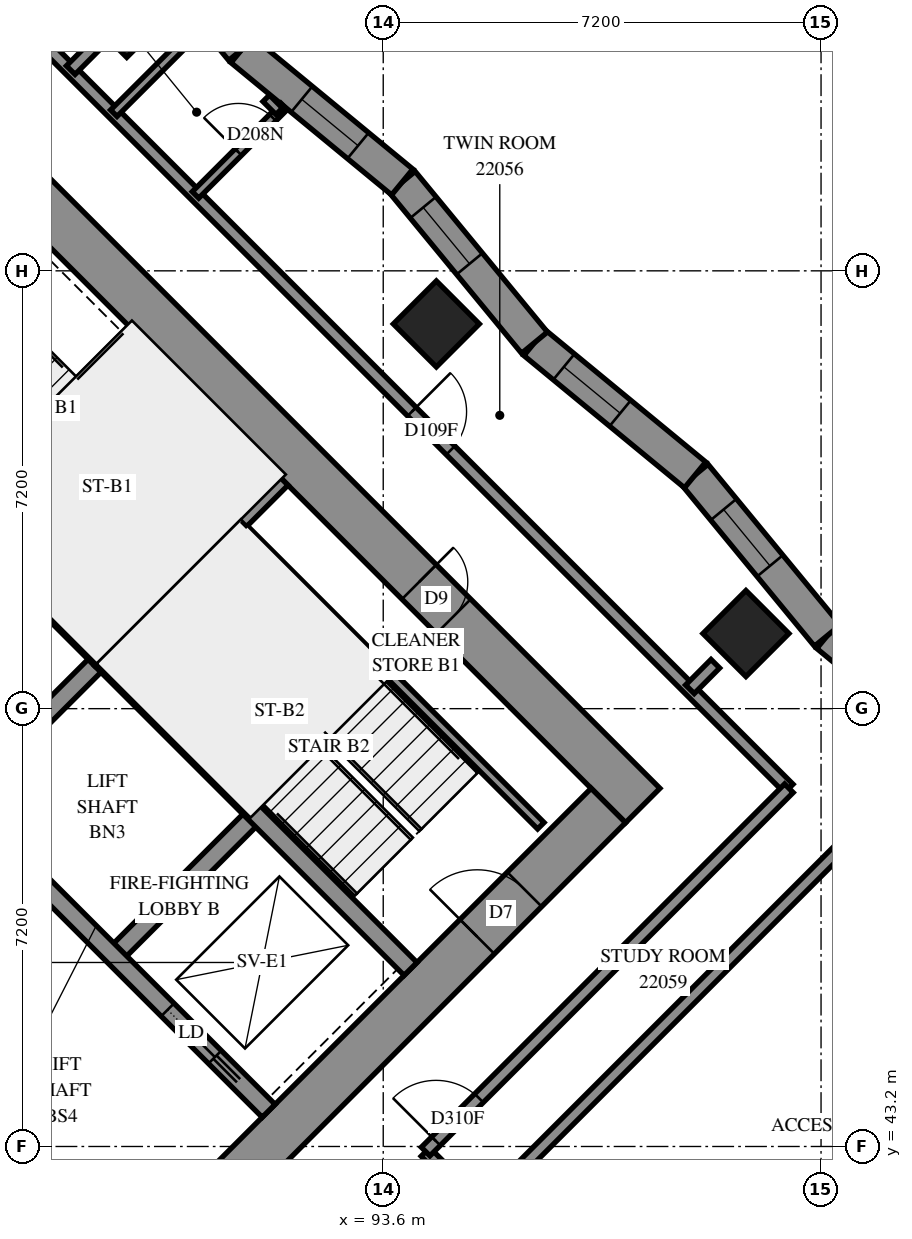
"""IFC4 building model, lengths in metres.
Left out: names, types, materials, properties, quantities, classifications, styles, units other than length and angle.
Written with IfcOpenShell. Run it as: python <this file> out.ifc"""

import sys

from ifc_helpers import new_model, si_unit, direction, frame, frame_2d, origin, origin_2d, place, context, subcontext, project, spatial, polyline, rectangle, outline, extrude, element, fill, save


model = new_model("IFC4")
c1 = context("Model", 3, precision=1e-05, world=origin(), true_north=direction((0.0, 1.0)))
c2 = subcontext(c1, "Body", "Model", "MODEL_VIEW")
j1 = project(units=[si_unit("LENGTHUNIT", "METRE"), si_unit("PLANEANGLEUNIT", "RADIAN")], contexts=[c1])
p1 = place(None, origin())
s1 = spatial("IfcSite", under=j1, at=p1, CompositionType="ELEMENT")
p2 = place(p1, origin())
s2 = spatial("IfcBuilding", under=s1, at=p2, CompositionType="ELEMENT")
p3 = place(p2, frame((0.0, 0.0, 84.6)))
s3 = spatial("IfcBuildingStorey", under=s2, at=p3, CompositionType="ELEMENT", Elevation=84.6)
for number, where, z_axis, x_axis in (
    (1, (89.382, 61.818, 0.0), (0.0, 0.0, 1.0), (0.707, -0.707, 0.0)),
    (2, (94.474, 56.727, 0.0), (0.0, 0.0, 1.0), (0.707, -0.707, 0.0)),
    (3, (99.565, 51.635, 0.0), (0.0, 0.0, 1.0), (0.707, -0.707, 0.0)),
):
    element("IfcColumn", number, at=place(p3, frame(where, z_axis=z_axis, x_axis=x_axis)), inside=s3, PredefinedType="COLUMN", context=c2, shape_type="SweptSolid", body=[
        extrude(rectangle(XDim=1.0, YDim=1.0, at=origin_2d()), origin(), (0.0, 0.0, 1.0), 3.1),
    ])
p4 = place(p3, frame((86.554, 60.121, -0.3), z_axis=(0.0, 0.0, 1.0), x_axis=(0.7071067812, -0.7071067812, 0.0)))
e4 = element("IfcWall", 4, at=p4, inside=s3, PredefinedType="SHEAR", context=c2, shape_type="SweptSolid", body=[
    extrude(rectangle(XDim=16.0, YDim=0.8, at=frame_2d((8.0, 0.0))), origin(), (0.0, 0.0, 1.0), 2.7),
])
p5 = place(p4, frame((10.8, 0.0, 0.3)))
e5 = element("IfcOpeningElement", 5, at=p5, cuts=e4, PredefinedType="OPENING", context=c2, shape_type="SweptSolid", body=[
    extrude(rectangle(XDim=0.8, YDim=2.1, at=frame_2d((0.4, 1.05))), frame((0.0, 0.41, 0.0), z_axis=(0.0, -1.0, 0.0), x_axis=(1.0, 0.0, 0.0)), (0.0, 0.0, 1.0), 0.82),
])
p6 = place(p3, frame((87.12, 38.625, -0.3), z_axis=(0.0, 0.0, 1.0), x_axis=(0.7071067812, 0.7071067812, 0.0)))
e6 = element("IfcWall", 6, at=p6, inside=s3, PredefinedType="SHEAR", context=c2, shape_type="SweptSolid", body=[
    extrude(rectangle(XDim=14.4, YDim=0.8, at=frame_2d((7.2, 0.0))), origin(), (0.0, 0.0, 1.0), 2.7),
])
p7 = place(p6, frame((4.55, 0.0, 0.3)))
e7 = element("IfcOpeningElement", 7, at=p7, cuts=e6, PredefinedType="OPENING", context=c2, shape_type="SweptSolid", body=[
    extrude(rectangle(XDim=1.1, YDim=2.1, at=frame_2d((0.55, 1.05))), frame((0.0, 0.41, 0.0), z_axis=(0.0, -1.0, 0.0), x_axis=(1.0, 0.0, 0.0)), (0.0, 0.0, 1.0), 0.82),
])
p8 = place(p6, frame((11.35, 0.0, 0.3)))
e8 = element("IfcOpeningElement", 8, at=p8, cuts=e6, PredefinedType="OPENING", context=c2, shape_type="SweptSolid", body=[
    extrude(rectangle(XDim=1.1, YDim=2.1, at=frame_2d((0.55, 1.05))), frame((0.0, 0.41, 0.0), z_axis=(0.0, -1.0, 0.0), x_axis=(1.0, 0.0, 0.0)), (0.0, 0.0, 1.0), 0.82),
])
for number, where, z_axis, x_axis in (
    (9, (86.625, 48.878, 0.0), (0.0, 0.0, 1.0), (0.707, 0.707, 0.0)),
    (10, (89.17, 46.332, 0.0), (0.0, 0.0, 1.0), (0.707, 0.707, 0.0)),
):
    element("IfcWall", number, at=place(p3, frame(where, z_axis=z_axis, x_axis=x_axis)), inside=s3, PredefinedType="SOLIDWALL", context=c2, shape_type="SweptSolid", body=[
        extrude(rectangle(XDim=3.3, YDim=0.3, at=frame_2d((1.65, 0.0))), origin(), (0.0, 0.0, 1.0), 3.1),
    ])
p9 = place(p3, frame((78.988, 51.423, 0.0), z_axis=(0.0, 0.0, 1.0), x_axis=(0.7071067812, -0.7071067812, 0.0)))
e11 = element("IfcWall", 11, at=p9, inside=s3, PredefinedType="SOLIDWALL", context=c2, shape_type="SweptSolid", body=[
    extrude(rectangle(XDim=14.4, YDim=0.3, at=frame_2d((7.2, 0.0))), origin(), (0.0, 0.0, 1.0), 3.1),
])
p10 = place(p9, frame((1.25, 0.0, 0.0)))
e12 = element("IfcOpeningElement", 12, at=p10, cuts=e11, PredefinedType="OPENING", context=c2, shape_type="SweptSolid", body=[
    extrude(rectangle(XDim=1.1, YDim=2.1, at=frame_2d((0.55, 1.05))), frame((0.0, 0.16, 0.0), z_axis=(0.0, -1.0, 0.0), x_axis=(1.0, 0.0, 0.0)), (0.0, 0.0, 1.0), 0.32),
])
p11 = place(p9, frame((4.85, 0.0, 0.0)))
e13 = element("IfcOpeningElement", 13, at=p11, cuts=e11, PredefinedType="OPENING", context=c2, shape_type="SweptSolid", body=[
    extrude(rectangle(XDim=1.1, YDim=2.1, at=frame_2d((0.55, 1.05))), frame((0.0, 0.16, 0.0), z_axis=(0.0, -1.0, 0.0), x_axis=(1.0, 0.0, 0.0)), (0.0, 0.0, 1.0), 0.32),
])
p12 = place(p9, frame((8.45, 0.0, 0.0)))
e14 = element("IfcOpeningElement", 14, at=p12, cuts=e11, PredefinedType="OPENING", context=c2, shape_type="SweptSolid", body=[
    extrude(rectangle(XDim=1.1, YDim=2.1, at=frame_2d((0.55, 1.05))), frame((0.0, 0.16, 0.0), z_axis=(0.0, -1.0, 0.0), x_axis=(1.0, 0.0, 0.0)), (0.0, 0.0, 1.0), 0.32),
])
p13 = place(p9, frame((12.05, 0.0, 0.0)))
e15 = element("IfcOpeningElement", 15, at=p13, cuts=e11, PredefinedType="OPENING", context=c2, shape_type="SweptSolid", body=[
    extrude(rectangle(XDim=1.1, YDim=2.1, at=frame_2d((0.55, 1.05))), frame((0.0, 0.16, 0.0), z_axis=(0.0, -1.0, 0.0), x_axis=(1.0, 0.0, 0.0)), (0.0, 0.0, 1.0), 0.32),
])
p14 = place(p3, frame((81.534, 53.969, 0.0), z_axis=(0.0, 0.0, 1.0), x_axis=(0.707103309, -0.7071102534, 0.0)))
e16 = element("IfcWall", 16, at=p14, inside=s3, PredefinedType="SOLIDWALL", context=c2, shape_type="SweptSolid", body=[
    extrude(rectangle(XDim=14.4, YDim=0.3, at=frame_2d((7.2, 0.0))), origin(), (0.0, 0.0, 1.0), 3.1),
])
p15 = place(p14, frame((12.05, 0.0, 0.0)))
e17 = element("IfcOpeningElement", 17, at=p15, cuts=e16, PredefinedType="OPENING", context=c2, shape_type="SweptSolid", body=[
    extrude(rectangle(XDim=1.1, YDim=2.1, at=frame_2d((0.55, 1.05))), frame((0.0, 0.16, 0.0), z_axis=(0.0, -1.0, 0.0), x_axis=(1.0, 0.0, 0.0)), (0.0, 0.0, 1.0), 0.32),
])
for number, where, z_axis, x_axis in (
    (18, (83.867, 56.302, 0.0), (0.0, 0.0, 1.0), (0.707, -0.707, 0.0)),
    (19, (88.958, 51.211, 0.0), (0.0, 0.0, 1.0), (0.707, -0.707, 0.0)),
):
    element("IfcWall", number, at=place(p3, frame(where, z_axis=z_axis, x_axis=x_axis)), inside=s3, PredefinedType="SOLIDWALL", context=c2, shape_type="SweptSolid", body=[
        extrude(rectangle(XDim=7.2, YDim=0.3, at=frame_2d((3.6, 0.0))), origin(), (0.0, 0.0, 1.0), 3.1),
    ])
p16 = place(p3, frame((88.958, 51.211, 0.0), z_axis=(0.0, 0.0, 1.0), x_axis=(0.7071067812, 0.7071067812, 0.0)))
e20 = element("IfcWall", 20, at=p16, inside=s3, PredefinedType="SOLIDWALL", context=c2, shape_type="SweptSolid", body=[
    extrude(rectangle(XDim=4.2, YDim=0.3, at=frame_2d((2.1, 0.0))), origin(), (0.0, 0.0, 1.0), 3.1),
])
p17 = place(p3, frame((103.546, 49.427, 0.0), z_axis=(0.0, 0.0, 1.0), x_axis=(-0.7720069983, 0.6356140296, 0.0)))
e21 = element("IfcWall", 21, at=p17, inside=s3, PredefinedType="SOLIDWALL", context=c2, shape_type="SweptSolid", body=[
    extrude(outline(polyline([(-0.027, -0.275), (3.395, -0.275), (3.449, 0.275), (0.027, 0.275), (-0.027, -0.275)])), origin(), (0.0, 0.0, 1.0), 3.1),
])
p18 = place(p17, frame((1.401, 0.0, 0.5)))
e22 = element("IfcOpeningElement", 22, at=p18, cuts=e21, PredefinedType="OPENING", context=c2, shape_type="SweptSolid", body=[
    extrude(rectangle(XDim=1.2, YDim=2.45, at=frame_2d((0.6, 1.225))), frame((0.0, 0.285, 0.0), z_axis=(0.0, -1.0, 0.0), x_axis=(1.0, 0.0, 0.0)), (0.0, 0.0, 1.0), 0.57),
])
p19 = place(p3, frame((100.904, 51.602, 0.0), z_axis=(0.0, 0.0, 1.0), x_axis=(-0.6356171067, 0.7720044648, 0.0)))
e23 = element("IfcWall", 23, at=p19, inside=s3, PredefinedType="SOLIDWALL", context=c2, shape_type="SweptSolid", body=[
    extrude(outline(polyline([(0.027, -0.275), (3.449, -0.275), (3.395, 0.275), (-0.027, 0.275), (0.027, -0.275)])), origin(), (0.0, 0.0, 1.0), 3.1),
])
p20 = place(p19, frame((1.485, 0.0, 0.5)))
e24 = element("IfcOpeningElement", 24, at=p20, cuts=e23, PredefinedType="OPENING", context=c2, shape_type="SweptSolid", body=[
    extrude(rectangle(XDim=1.2, YDim=2.45, at=frame_2d((0.6, 1.225))), frame((0.0, 0.285, 0.0), z_axis=(0.0, -1.0, 0.0), x_axis=(1.0, 0.0, 0.0)), (0.0, 0.0, 1.0), 0.57),
])
p21 = place(p3, frame((98.729, 54.244, 0.0), z_axis=(0.0, 0.0, 1.0), x_axis=(-0.7720044648, 0.6356171067, 0.0)))
e25 = element("IfcWall", 25, at=p21, inside=s3, PredefinedType="SOLIDWALL", context=c2, shape_type="SweptSolid", body=[
    extrude(outline(polyline([(-0.027, -0.275), (3.395, -0.275), (3.449, 0.275), (0.027, 0.275), (-0.027, -0.275)])), origin(), (0.0, 0.0, 1.0), 3.1),
])
p22 = place(p21, frame((1.596, 0.0, 0.5)))
e26 = element("IfcOpeningElement", 26, at=p22, cuts=e25, PredefinedType="OPENING", context=c2, shape_type="SweptSolid", body=[
    extrude(rectangle(XDim=1.2, YDim=2.45, at=frame_2d((0.6, 1.225))), frame((0.0, 0.285, 0.0), z_axis=(0.0, -1.0, 0.0), x_axis=(1.0, 0.0, 0.0)), (0.0, 0.0, 1.0), 0.57),
])
p23 = place(p3, frame((96.088, 56.419, 0.0), z_axis=(0.0, 0.0, 1.0), x_axis=(-0.6356140296, 0.7720069983, 0.0)))
e27 = element("IfcWall", 27, at=p23, inside=s3, PredefinedType="SOLIDWALL", context=c2, shape_type="SweptSolid", body=[
    extrude(outline(polyline([(0.027, -0.275), (3.449, -0.275), (3.395, 0.275), (-0.027, 0.275), (0.027, -0.275)])), origin(), (0.0, 0.0, 1.0), 3.1),
])
p24 = place(p23, frame((1.68, 0.0, 0.5)))
e28 = element("IfcOpeningElement", 28, at=p24, cuts=e27, PredefinedType="OPENING", context=c2, shape_type="SweptSolid", body=[
    extrude(rectangle(XDim=1.2, YDim=2.45, at=frame_2d((0.6, 1.225))), frame((0.0, 0.285, 0.0), z_axis=(0.0, -1.0, 0.0), x_axis=(1.0, 0.0, 0.0)), (0.0, 0.0, 1.0), 0.57),
])
p25 = place(p3, frame((93.913, 59.06, 0.0), z_axis=(0.0, 0.0, 1.0), x_axis=(-0.7720044648, 0.6356171067, 0.0)))
e29 = element("IfcWall", 29, at=p25, inside=s3, PredefinedType="SOLIDWALL", context=c2, shape_type="SweptSolid", body=[
    extrude(outline(polyline([(-0.027, -0.275), (3.395, -0.275), (3.449, 0.275), (0.027, 0.275), (-0.027, -0.275)])), origin(), (0.0, 0.0, 1.0), 3.1),
])
p26 = place(p25, frame((0.941, 0.0, 0.5)))
e30 = element("IfcOpeningElement", 30, at=p26, cuts=e29, PredefinedType="OPENING", context=c2, shape_type="SweptSolid", body=[
    extrude(rectangle(XDim=1.2, YDim=2.45, at=frame_2d((0.6, 1.225))), frame((0.0, 0.285, 0.0), z_axis=(0.0, -1.0, 0.0), x_axis=(1.0, 0.0, 0.0)), (0.0, 0.0, 1.0), 0.57),
])
p27 = place(p3, frame((91.271, 61.235, 0.0), z_axis=(0.0, 0.0, 1.0), x_axis=(-0.6356171067, 0.7720044648, 0.0)))
e31 = element("IfcWall", 31, at=p27, inside=s3, PredefinedType="SOLIDWALL", context=c2, shape_type="SweptSolid", body=[
    extrude(outline(polyline([(0.027, -0.275), (3.449, -0.275), (3.395, 0.275), (-0.027, 0.275), (0.027, -0.275)])), origin(), (0.0, 0.0, 1.0), 3.1),
])
p28 = place(p27, frame((1.875, 0.0, 0.5)))
e32 = element("IfcOpeningElement", 32, at=p28, cuts=e31, PredefinedType="OPENING", context=c2, shape_type="SweptSolid", body=[
    extrude(rectangle(XDim=1.2, YDim=2.45, at=frame_2d((0.6, 1.225))), frame((0.0, 0.285, 0.0), z_axis=(0.0, -1.0, 0.0), x_axis=(1.0, 0.0, 0.0)), (0.0, 0.0, 1.0), 0.57),
])
p29 = place(p27, frame((0.925, 0.0, 0.45)))
e33 = element("IfcOpeningElement", 33, at=p29, cuts=e31, PredefinedType="OPENING", context=c2, shape_type="SweptSolid", body=[
    extrude(rectangle(XDim=0.8, YDim=2.5, at=frame_2d((0.4, 1.25))), frame((0.0, 0.285, 0.0), z_axis=(0.0, -1.0, 0.0), x_axis=(1.0, 0.0, 0.0)), (0.0, 0.0, 1.0), 0.57),
])
p30 = place(p3, frame((91.313, 53.354, 0.0), z_axis=(0.0, 0.0, 1.0), x_axis=(0.7071140275, -0.7070995348, 0.0)))
e34 = element("IfcWall", 34, at=p30, inside=s3, PredefinedType="PARTITIONING", context=c2, shape_type="SweptSolid", body=[
    extrude(rectangle(XDim=6.9, YDim=0.15, at=frame_2d((3.45, 0.0))), origin(), (0.0, 0.0, 1.0), 3.1),
])
p31 = place(p3, frame((87.894, 61.461, 0.0), z_axis=(0.0, 0.0, 1.0), x_axis=(0.7071067812, -0.7071067812, 0.0)))
e35 = element("IfcWall", 35, at=p31, inside=s3, PredefinedType="PARTITIONING", context=c2, shape_type="SweptSolid", body=[
    extrude(rectangle(XDim=17.5, YDim=0.2, at=frame_2d((8.75, 0.0))), origin(), (0.0, 0.0, 1.0), 3.1),
])
p32 = place(p31, frame((8.735, 0.0, 0.0)))
e36 = element("IfcOpeningElement", 36, at=p32, cuts=e35, PredefinedType="OPENING", context=c2, shape_type="SweptSolid", body=[
    extrude(rectangle(XDim=0.9, YDim=2.1, at=frame_2d((0.45, 1.05))), frame((0.0, 0.11, 0.0), z_axis=(0.0, -1.0, 0.0), x_axis=(1.0, 0.0, 0.0)), (0.0, 0.0, 1.0), 0.22),
])
p33 = place(p3, frame((95.215, 42.197, 0.0), z_axis=(0.0, 0.0, 1.0), x_axis=(0.7071114753, 0.7071020871, 0.0)))
e37 = element("IfcWall", 37, at=p33, inside=s3, PredefinedType="PARTITIONING", context=c2, shape_type="SweptSolid", body=[
    extrude(rectangle(XDim=10.652, YDim=0.2, at=frame_2d((5.326, 0.0))), origin(), (0.0, 0.0, 1.0), 3.1),
])
p34 = place(p3, frame((94.294, 43.111, 0.0), z_axis=(0.0, 0.0, 1.0), x_axis=(0.7071067812, -0.7071067812, 0.0)))
e38 = element("IfcWall", 38, at=p34, inside=s3, PredefinedType="PARTITIONING", context=c2, shape_type="SweptSolid", body=[
    extrude(rectangle(XDim=8.499, YDim=0.2, at=frame_2d((4.25, 0.0))), origin(), (0.0, 0.0, 1.0), 3.1),
])
p35 = place(p34, frame((3.651, 0.0, 0.0)))
e39 = element("IfcOpeningElement", 39, at=p35, cuts=e38, PredefinedType="OPENING", context=c2, shape_type="SweptSolid", body=[
    extrude(rectangle(XDim=0.9, YDim=2.1, at=frame_2d((0.45, 1.05))), frame((0.0, 0.11, 0.0), z_axis=(0.0, -1.0, 0.0), x_axis=(1.0, 0.0, 0.0)), (0.0, 0.0, 1.0), 0.22),
])
p36 = place(p3, frame((94.297, 43.117, 0.0), z_axis=(0.0, 0.0, 1.0), x_axis=(0.7071067812, 0.7071067812, 0.0)))
e40 = element("IfcWall", 40, at=p36, inside=s3, PredefinedType="PARTITIONING", context=c2, shape_type="SweptSolid", body=[
    extrude(rectangle(XDim=8.448, YDim=0.2, at=frame_2d((4.224, 0.0))), origin(), (0.0, 0.0, 1.0), 3.1),
])
p37 = place(p36, frame((0.242, 0.0, 0.0)))
e41 = element("IfcOpeningElement", 41, at=p37, cuts=e40, PredefinedType="OPENING", context=c2, shape_type="SweptSolid", body=[
    extrude(rectangle(XDim=1.0, YDim=2.1, at=frame_2d((0.5, 1.05))), frame((0.0, 0.11, 0.0), z_axis=(0.0, -1.0, 0.0), x_axis=(1.0, 0.0, 0.0)), (0.0, 0.0, 1.0), 0.22),
])
p38 = place(p3, frame((90.513, 58.849, 0.0), z_axis=(0.0, 0.0, 1.0), x_axis=(0.7071067812, 0.7071067812, 0.0)))
e42 = element("IfcWall", 42, at=p38, inside=s3, PredefinedType="PARTITIONING", context=c2, shape_type="SweptSolid", body=[
    extrude(rectangle(XDim=2.059, YDim=0.15, at=frame_2d((1.029, 0.0))), origin(), (0.0, 0.0, 1.0), 3.1),
])
p39 = place(p38, frame((0.996, 0.0, 0.0)))
e43 = element("IfcOpeningElement", 43, at=p39, cuts=e42, PredefinedType="OPENING", context=c2, shape_type="SweptSolid", body=[
    extrude(rectangle(XDim=0.8, YDim=2.1, at=frame_2d((0.4, 1.05))), frame((0.0, 0.085, 0.0), z_axis=(0.0, -1.0, 0.0), x_axis=(1.0, 0.0, 0.0)), (0.0, 0.0, 1.0), 0.17),
])
p40 = place(p3, frame((89.169, 60.193, 0.0), z_axis=(0.0, 0.0, 1.0), x_axis=(0.7076512613, 0.7065618815, 0.0)))
e44 = element("IfcWall", 44, at=p40, inside=s3, PredefinedType="PARTITIONING", context=c2, shape_type="SweptSolid", body=[
    extrude(rectangle(XDim=2.019, YDim=0.15, at=frame_2d((1.01, 0.0))), origin(), (0.0, 0.0, 1.0), 3.1),
])
for number, where, z_axis, x_axis in (
    (45, (88.461, 60.901, 0.0), (0.0, 0.0, 1.0), (0.705, 0.709, 0.0)),
    (46, (98.644, 50.718, 0.0), (0.0, 0.0, 1.0), (0.705, 0.709, 0.0)),
):
    element("IfcWall", number, at=place(p3, frame(where, z_axis=z_axis, x_axis=x_axis)), inside=s3, PredefinedType="PARTITIONING", context=c2, shape_type="SweptSolid", body=[
        extrude(rectangle(XDim=0.593, YDim=0.2, at=frame_2d((0.296, 0.0))), origin(), (0.0, 0.0, 1.0), 3.1),
    ])
p41 = place(p3, frame((91.675, 60.437, 0.0), z_axis=(0.0, 0.0, 1.0), x_axis=(0.7071067812, -0.7071067812, 0.0)))
e47 = element("IfcWall", 47, at=p41, inside=s3, PredefinedType="PARTITIONING", context=c2, shape_type="SweptSolid", body=[
    extrude(rectangle(XDim=0.303, YDim=0.15, at=frame_2d((0.151, 0.0))), origin(), (0.0, 0.0, 1.0), 3.1),
])
p42 = place(p20, origin())
e48 = element("IfcWindow", 48, at=p42, inside=s3, PartitioningType="SINGLE_PANEL", PredefinedType="WINDOW", context=c2, shape_type="SweptSolid", body=[
    extrude(rectangle(XDim=1.2, YDim=2.45, at=frame_2d((0.6, 1.225))), frame((0.0, 0.155, 0.0), z_axis=(0.0, -1.0, 0.0), x_axis=(1.0, 0.0, 0.0)), (0.0, 0.0, 1.0), 0.06),
])
fill(e24, e48)
p43 = place(p22, origin())
e49 = element("IfcWindow", 49, at=p43, inside=s3, PartitioningType="SINGLE_PANEL", PredefinedType="WINDOW", context=c2, shape_type="SweptSolid", body=[
    extrude(rectangle(XDim=1.2, YDim=2.45, at=frame_2d((0.6, 1.225))), frame((0.0, 0.155, 0.0), z_axis=(0.0, -1.0, 0.0), x_axis=(1.0, 0.0, 0.0)), (0.0, 0.0, 1.0), 0.06),
])
fill(e26, e49)
p44 = place(p24, origin())
e50 = element("IfcWindow", 50, at=p44, inside=s3, PartitioningType="SINGLE_PANEL", PredefinedType="WINDOW", context=c2, shape_type="SweptSolid", body=[
    extrude(rectangle(XDim=1.2, YDim=2.45, at=frame_2d((0.6, 1.225))), frame((0.0, 0.155, 0.0), z_axis=(0.0, -1.0, 0.0), x_axis=(1.0, 0.0, 0.0)), (0.0, 0.0, 1.0), 0.06),
])
fill(e28, e50)
p45 = place(p26, origin())
e51 = element("IfcWindow", 51, at=p45, inside=s3, PartitioningType="SINGLE_PANEL", PredefinedType="WINDOW", context=c2, shape_type="SweptSolid", body=[
    extrude(rectangle(XDim=1.2, YDim=2.45, at=frame_2d((0.6, 1.225))), frame((0.0, 0.155, 0.0), z_axis=(0.0, -1.0, 0.0), x_axis=(1.0, 0.0, 0.0)), (0.0, 0.0, 1.0), 0.06),
])
fill(e30, e51)
p46 = place(p5, origin())
e52 = element("IfcDoor", 52, at=p46, inside=s3, OperationType="SINGLE_SWING_RIGHT", PredefinedType="DOOR", context=c2, shape_type="SweptSolid", body=[
    extrude(rectangle(XDim=0.8, YDim=2.1, at=frame_2d((0.4, 1.05))), frame((0.0, -0.34, 0.0), z_axis=(0.0, -1.0, 0.0), x_axis=(1.0, 0.0, 0.0)), (0.0, 0.0, 1.0), 0.05),
])
fill(e5, e52)
p47 = place(p8, origin())
e53 = element("IfcDoor", 53, at=p47, inside=s3, OperationType="SINGLE_SWING_RIGHT", PredefinedType="DOOR", context=c2, shape_type="SweptSolid", body=[
    extrude(rectangle(XDim=1.1, YDim=2.1, at=frame_2d((0.55, 1.05))), frame((0.0, 0.025, 0.0), z_axis=(0.0, -1.0, 0.0), x_axis=(1.0, 0.0, 0.0)), (0.0, 0.0, 1.0), 0.05),
])
fill(e8, e53)
p48 = place(p15, origin())
e54 = element("IfcDoor", 54, at=p48, inside=s3, OperationType="SLIDING_TO_RIGHT", PredefinedType="DOOR", context=c2, shape_type="SweptSolid", body=[
    extrude(rectangle(XDim=1.1, YDim=2.1, at=frame_2d((0.55, 1.05))), frame((0.0, 0.025, 0.0), z_axis=(0.0, -1.0, 0.0), x_axis=(1.0, 0.0, 0.0)), (0.0, 0.0, 1.0), 0.05),
])
fill(e17, e54)
p49 = place(p32, origin())
e55 = element("IfcDoor", 55, at=p49, inside=s3, OperationType="SINGLE_SWING_LEFT", PredefinedType="DOOR", context=c2, shape_type="SweptSolid", body=[
    extrude(rectangle(XDim=0.9, YDim=2.1, at=frame_2d((0.45, 1.05))), frame((0.0, 0.025, 0.0), z_axis=(0.0, -1.0, 0.0), x_axis=(1.0, 0.0, 0.0)), (0.0, 0.0, 1.0), 0.05),
])
fill(e36, e55)
p50 = place(p39, origin())
e56 = element("IfcDoor", 56, at=p50, inside=s3, OperationType="SINGLE_SWING_RIGHT", PredefinedType="DOOR", context=c2, shape_type="SweptSolid", body=[
    extrude(rectangle(XDim=0.8, YDim=2.1, at=frame_2d((0.4, 1.05))), frame((0.0, 0.025, 0.0), z_axis=(0.0, -1.0, 0.0), x_axis=(1.0, 0.0, 0.0)), (0.0, 0.0, 1.0), 0.05),
])
fill(e43, e56)
p51 = place(p37, origin())
e57 = element("IfcDoor", 57, at=p51, inside=s3, OperationType="SINGLE_SWING_LEFT", PredefinedType="DOOR", context=c2, shape_type="SweptSolid", body=[
    extrude(rectangle(XDim=1.0, YDim=2.1, at=frame_2d((0.5, 1.05))), frame((0.0, 0.025, 0.0), z_axis=(0.0, -1.0, 0.0), x_axis=(1.0, 0.0, 0.0)), (0.0, 0.0, 1.0), 0.05),
])
fill(e41, e57)
save(model, sys.argv[1])
